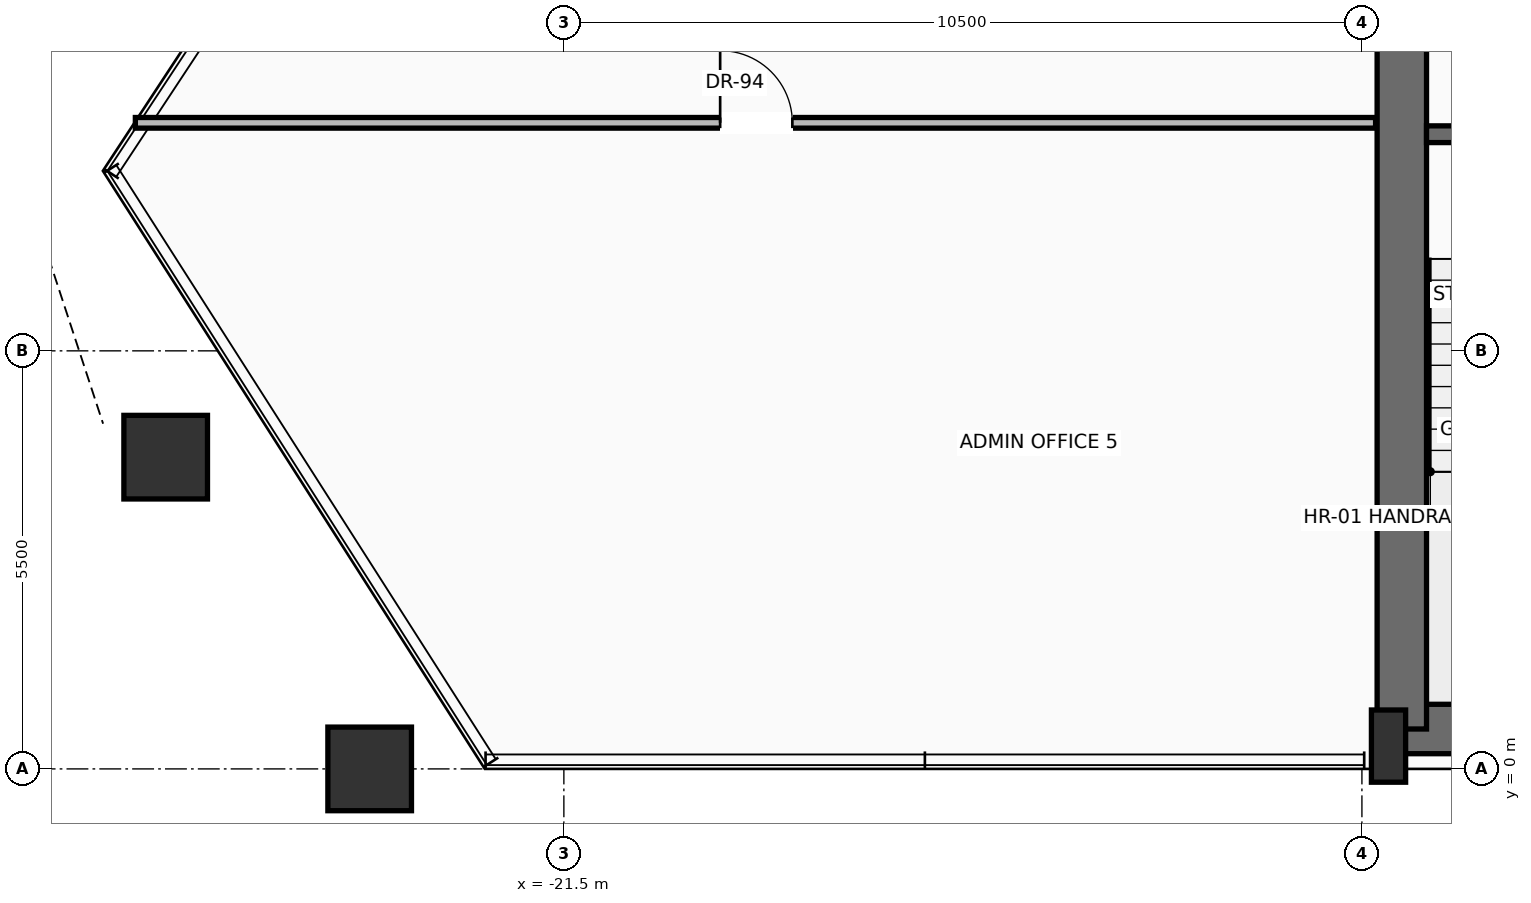
"""IFC4 building model, lengths in metres.
Left out: names, types, materials, properties, quantities, classifications, styles, units other than length and angle.
Written with IfcOpenShell. Run it as: python <this file> out.ifc"""

import sys

from ifc_helpers import new_model, si_unit, direction, frame, frame_2d, origin, origin_2d, place, context, subcontext, project, spatial, rectangle, hollow_rectangle, extrude, source, transform, mapped, element, fill, save


model = new_model("IFC4")
c1 = context("Model", 3, precision=1e-05, world=origin(), true_north=direction((0.0, 1.0)))
c2 = subcontext(c1, "Body", "Model", "MODEL_VIEW")
j1 = project(units=[si_unit("LENGTHUNIT", "METRE"), si_unit("PLANEANGLEUNIT", "RADIAN")], contexts=[c1])
p1 = place(None, origin())
s1 = spatial("IfcSite", under=j1, at=p1, CompositionType="ELEMENT")
p2 = place(p1, origin())
s2 = spatial("IfcBuilding", under=s1, at=p2, CompositionType="ELEMENT")
p3 = place(p2, frame((0.0, 0.0, 129.3)))
s3 = spatial("IfcBuildingStorey", under=s2, at=p3, CompositionType="ELEMENT", Elevation=129.3)
p4 = place(p3, frame((-10.65, 0.525, 0.0), z_axis=(0.0, 0.0, 1.0), x_axis=(1.0, 0.0, 0.0)))
e1 = element("IfcWall", 1, at=p4, inside=s3, PredefinedType="SHEAR", context=c2, shape_type="SweptSolid", body=[
    extrude(rectangle(XDim=21.3, YDim=0.65, at=frame_2d((10.65, 0.0))), origin(), (0.0, 0.0, 1.0), 3.47),
])
p5 = place(p3, frame((-10.475, 0.525, 0.0), z_axis=(0.0, 0.0, 1.0), x_axis=(0.0, 1.0, 0.0)))
e2 = element("IfcWall", 2, at=p5, inside=s3, PredefinedType="SHEAR", context=c2, shape_type="SweptSolid", body=[
    extrude(rectangle(XDim=15.55, YDim=0.65, at=frame_2d((7.775, 0.0))), origin(), (0.0, 0.0, 1.0), 3.47),
])
m1 = source(origin(), c2, "Body", "SweptSolid", [
    extrude(rectangle(XDim=0.45, YDim=0.95, at=origin_2d()), origin(), (0.0, 0.0, 1.0), 3.7),
])
p6 = place(p3, frame((-10.65, 0.3, 0.0), z_axis=(0.0, 0.0, 1.0), x_axis=(1.0, 0.0, 0.0)))
e3 = element("IfcColumn", 3, at=p6, inside=s3, PredefinedType="PILASTER", context=c2, shape_type="MappedRepresentation", body=[
    mapped(m1, transform((0.0, 0.0, 0.0), scale=1.0)),
])
m2 = source(origin(), c2, "Body", "SweptSolid", [
    extrude(hollow_rectangle(XDim=1.1, YDim=1.1, WallThickness=0.055, at=origin_2d()), origin(), (0.0, 0.0, 1.0), 3.691),
])
p7 = place(p3, frame((-24.055, 0.0, 0.004), z_axis=(-0.011706321299, 0.0, 0.999931478673), x_axis=(0.0, -1.0, 0.0)))
e4 = element("IfcColumn", 4, at=p7, inside=s3, PredefinedType="COLUMN", context=c2, shape_type="MappedRepresentation", body=[
    mapped(m2, transform((0.0, 0.0, 0.0), scale=1.0)),
])
m3 = source(origin(), c2, "Body", "SweptSolid", [
    extrude(hollow_rectangle(XDim=1.1, YDim=1.1, WallThickness=0.055, at=origin_2d()), origin(), (0.0, 0.0, 1.0), 3.692),
])
p8 = place(p3, frame((-26.739, 4.101, 0.004), z_axis=(-0.000396798663, -0.016334878303, 0.999866498239), x_axis=(0.99970509207, -0.02428433422, 0.0)))
e5 = element("IfcColumn", 5, at=p8, inside=s3, PredefinedType="COLUMN", context=c2, shape_type="MappedRepresentation", body=[
    mapped(m3, transform((0.0, 0.0, 0.0), scale=1.0)),
])
p9 = place(p3, frame((-5.5, 8.35, 0.0), z_axis=(0.0, 0.0, 1.0), x_axis=(-1.0, 0.0, 0.0)))
e6 = element("IfcWall", 6, at=p9, inside=s3, PredefinedType="SOLIDWALL", context=c2, shape_type="SweptSolid", body=[
    extrude(rectangle(XDim=4.65, YDim=0.22, at=frame_2d((2.325, 0.0))), origin(), (0.0, 0.0, 1.0), 3.47),
])
p10 = place(p9, frame((2.5, 0.0, 0.0)))
e7 = element("IfcOpeningElement", 7, at=p10, cuts=e6, PredefinedType="OPENING", context=c2, shape_type="SweptSolid", body=[
    extrude(rectangle(XDim=1.15, YDim=2.2, at=frame_2d((0.575, 1.1))), frame((0.0, 0.12, 0.0), z_axis=(0.0, -1.0, 0.0), x_axis=(1.0, 0.0, 0.0)), (0.0, 0.0, 1.0), 0.24),
])
p11 = place(p3, frame((-27.138, 8.5, 0.0), z_axis=(0.0, 0.0, 1.0), x_axis=(1.0, 0.0, 0.0)))
e8 = element("IfcWall", 8, at=p11, inside=s3, PredefinedType="PARTITIONING", context=c2, shape_type="SweptSolid", body=[
    extrude(rectangle(XDim=16.318, YDim=0.14, at=frame_2d((8.159, 0.0))), origin(), (0.0, 0.0, 1.0), 3.462),
])
p12 = place(p11, frame((7.694, 0.0, 0.0)))
e9 = element("IfcOpeningElement", 9, at=p12, cuts=e8, PredefinedType="OPENING", context=c2, shape_type="SweptSolid", body=[
    extrude(rectangle(XDim=0.95, YDim=2.2, at=frame_2d((0.475, 1.1))), frame((0.0, 0.08, 0.0), z_axis=(0.0, -1.0, 0.0), x_axis=(1.0, 0.0, 0.0)), (0.0, 0.0, 1.0), 0.16),
])
m4 = source(origin(), c2, "Body", "SweptSolid", [
    extrude(rectangle(XDim=0.95, YDim=2.2, at=frame_2d((0.475, 1.1))), frame((0.0, 0.025, 0.0), z_axis=(0.0, -1.0, 0.0), x_axis=(1.0, 0.0, 0.0)), (0.0, 0.0, 1.0), 0.05),
])
p13 = place(p12, origin())
e10 = element("IfcDoor", 10, at=p13, inside=s3, OperationType="SINGLE_SWING_LEFT", PredefinedType="DOOR", context=c2, shape_type="MappedRepresentation", body=[
    mapped(m4, transform((0.0, 0.0, 0.0), scale=1.0)),
])
fill(e9, e10)
save(model, sys.argv[1])
